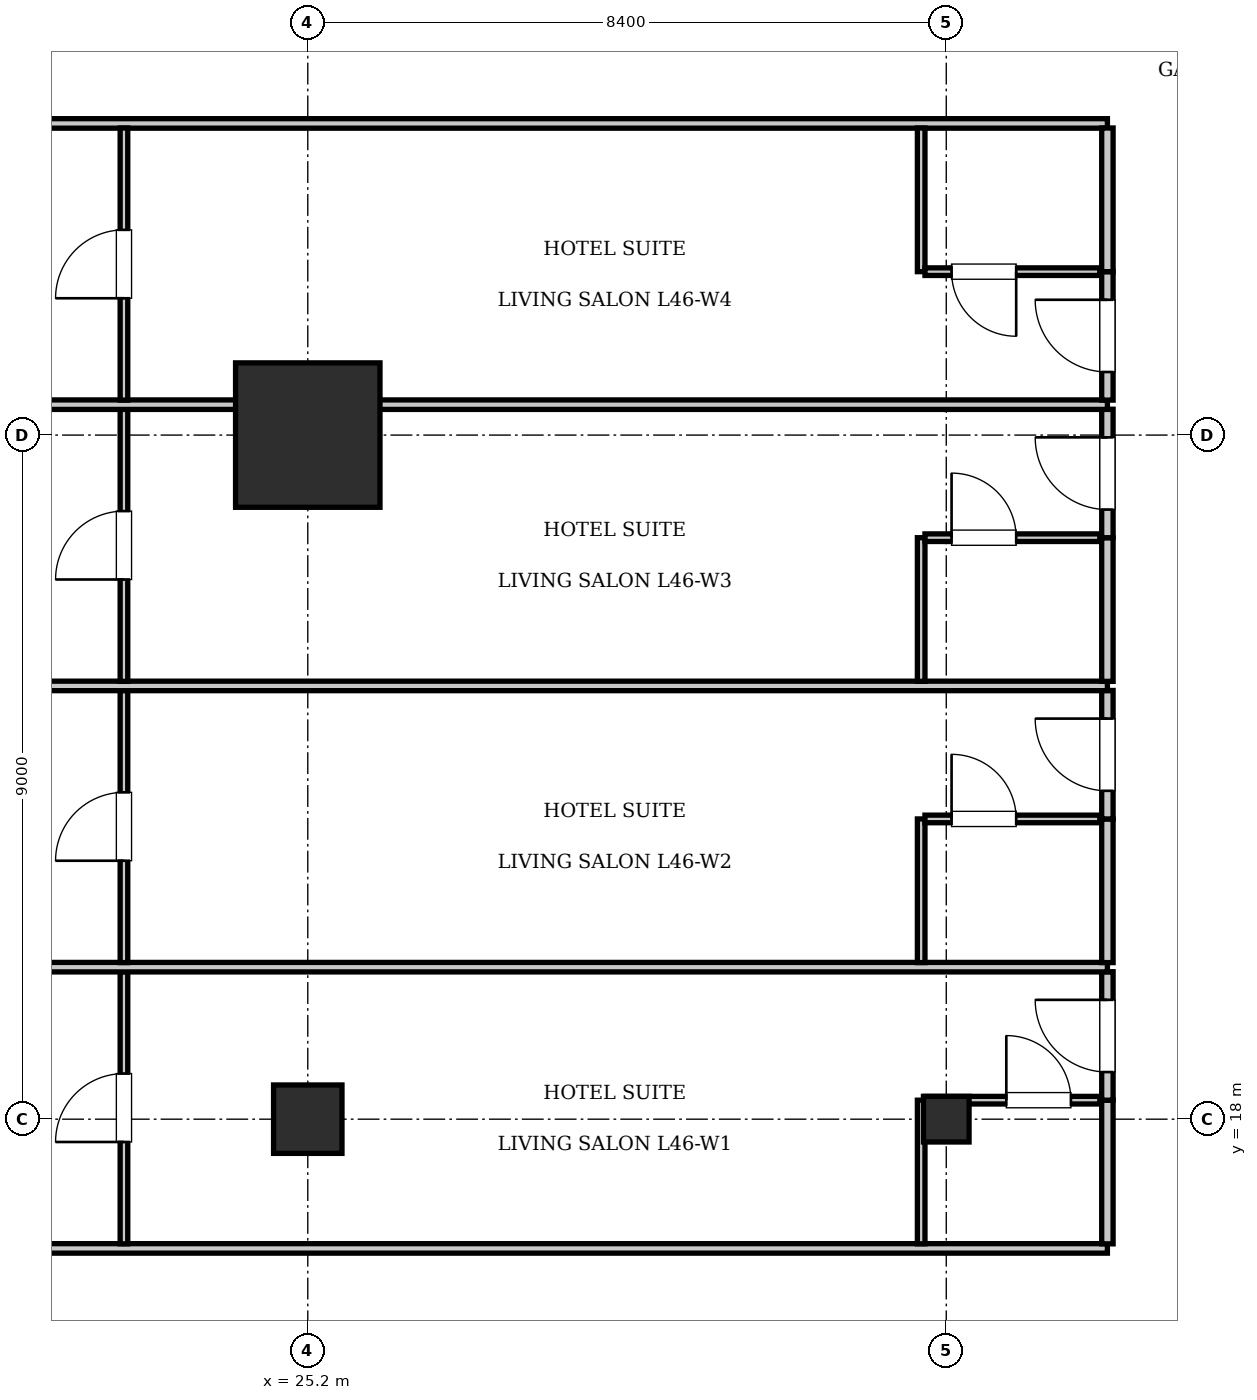
"""IFC4 building model, lengths in metres.
Left out: names, types, materials, properties, quantities, classifications, styles, units other than length and angle.
Written with IfcOpenShell. Run it as: python <this file> out.ifc"""

import sys

from ifc_helpers import new_model, si_unit, direction, frame, frame_2d, origin, origin_2d, place, context, subcontext, project, spatial, rectangle, i_section, extrude, element, fill, save


model = new_model("IFC4")
c1 = context("Model", 3, precision=1e-05, world=origin(), true_north=direction((0.0, 1.0)))
c2 = subcontext(c1, "Body", "Model", "MODEL_VIEW")
j1 = project(units=[si_unit("LENGTHUNIT", "METRE"), si_unit("PLANEANGLEUNIT", "RADIAN")], contexts=[c1])
p1 = place(None, origin())
s1 = spatial("IfcSite", under=j1, at=p1, CompositionType="ELEMENT")
p2 = place(p1, origin())
s2 = spatial("IfcBuilding", under=s1, at=p2, CompositionType="ELEMENT")
p3 = place(p2, frame((0.0, 0.0, 189.0)))
s3 = spatial("IfcBuildingStorey", under=s2, at=p3, CompositionType="ELEMENT", Elevation=189.0)
p4 = place(p3, frame((25.2, 27.0, 0.0), z_axis=(0.0, 0.0, 1.0), x_axis=(1.0, 0.0, 0.0)))
e1 = element("IfcColumn", 1, at=p4, inside=s3, PredefinedType="COLUMN", context=c2, shape_type="SweptSolid", body=[
    extrude(rectangle(XDim=1.9, YDim=1.9, at=origin_2d()), origin(), (0.0, 0.0, 1.0), 3.85),
])
p5 = place(p3, frame((25.2, 18.0, 0.0), z_axis=(0.0, 0.0, 1.0), x_axis=(1.0, 0.0, 0.0)))
e2 = element("IfcColumn", 2, at=p5, inside=s3, PredefinedType="COLUMN", context=c2, shape_type="SweptSolid", body=[
    extrude(rectangle(XDim=0.9, YDim=0.9, at=origin_2d()), origin(), (0.0, 0.0, 1.0), 3.85),
])
p6 = place(p3, frame((33.6, 18.0, 0.0), z_axis=(0.0, 0.0, 1.0), x_axis=(1.0, 0.0, 0.0)))
e3 = element("IfcColumn", 3, at=p6, inside=s3, PredefinedType="COLUMN", context=c2, shape_type="SweptSolid", body=[
    extrude(i_section(OverallWidth=0.6, OverallDepth=0.6, WebThickness=0.025, FlangeThickness=0.038, at=origin_2d()), origin(), (0.0, 0.0, 1.0), 3.85),
])
for number, where, z_axis, x_axis in (
    (4, (13.2, 16.3, 0.0), (0.0, 0.0, 1.0), (1.0, 0.0, 0.0)),
    (5, (13.2, 31.1, 0.0), (0.0, 0.0, 1.0), (1.0, 0.0, 0.0)),
):
    element("IfcWall", number, at=place(p3, frame(where, z_axis=z_axis, x_axis=x_axis)), inside=s3, PredefinedType="PARTITIONING", context=c2, shape_type="SweptSolid", body=[
        extrude(rectangle(XDim=22.52, YDim=0.125, at=frame_2d((11.26, 0.0))), origin(), (0.0, 0.0, 1.0), 3.61),
    ])
p7 = place(p3, frame((35.72, 16.36, 0.0), z_axis=(0.0, 0.0, 1.0), x_axis=(0.0, 1.0, 0.0)))
e6 = element("IfcWall", 6, at=p7, inside=s3, PredefinedType="PARTITIONING", context=c2, shape_type="SweptSolid", body=[
    extrude(rectangle(XDim=1.89, YDim=0.15, at=frame_2d((0.945, 0.0))), origin(), (0.0, 0.0, 1.0), 3.61),
])
p8 = place(p3, frame((35.72, 18.25, 0.0), z_axis=(0.0, 0.0, 1.0), x_axis=(0.0, 1.0, 0.0)))
e7 = element("IfcWall", 7, at=p8, inside=s3, PredefinedType="PARTITIONING", context=c2, shape_type="SweptSolid", body=[
    extrude(rectangle(XDim=1.69, YDim=0.15, at=frame_2d((0.845, 0.0))), origin(), (0.0, 0.0, 1.0), 3.61),
])
p9 = place(p8, frame((0.37, 0.0, 0.0)))
e8 = element("IfcOpeningElement", 8, at=p9, cuts=e7, PredefinedType="OPENING", context=c2, shape_type="SweptSolid", body=[
    extrude(rectangle(XDim=0.95, YDim=2.15, at=frame_2d((0.475, 1.075))), frame((0.0, 0.085, 0.0), z_axis=(0.0, -1.0, 0.0), x_axis=(1.0, 0.0, 0.0)), (0.0, 0.0, 1.0), 0.17),
])
p10 = place(p3, frame((33.27, 16.36, 0.0), z_axis=(0.0, 0.0, 1.0), x_axis=(0.0, 1.0, 0.0)))
e9 = element("IfcWall", 9, at=p10, inside=s3, PredefinedType="PARTITIONING", context=c2, shape_type="SweptSolid", body=[
    extrude(rectangle(XDim=1.89, YDim=0.1, at=frame_2d((0.945, 0.0))), origin(), (0.0, 0.0, 1.0), 3.61),
])
p11 = place(p3, frame((33.32, 18.25, 0.0), z_axis=(0.0, 0.0, 1.0), x_axis=(1.0, 0.0, 0.0)))
e10 = element("IfcWall", 10, at=p11, inside=s3, PredefinedType="PARTITIONING", context=c2, shape_type="SweptSolid", body=[
    extrude(rectangle(XDim=2.3, YDim=0.1, at=frame_2d((1.15, 0.0))), origin(), (0.0, 0.0, 1.0), 3.61),
])
p12 = place(p11, frame((1.07, 0.0, 0.0)))
e11 = element("IfcOpeningElement", 11, at=p12, cuts=e10, PredefinedType="OPENING", context=c2, shape_type="SweptSolid", body=[
    extrude(rectangle(XDim=0.85, YDim=2.1, at=frame_2d((0.425, 1.05))), frame((0.0, 0.06, 0.0), z_axis=(0.0, -1.0, 0.0), x_axis=(1.0, 0.0, 0.0)), (0.0, 0.0, 1.0), 0.12),
])
p13 = place(p3, frame((22.781, 16.36, 0.0), z_axis=(0.0, 0.0, 1.0), x_axis=(0.0, 1.0, 0.0)))
e12 = element("IfcWall", 12, at=p13, inside=s3, PredefinedType="PARTITIONING", context=c2, shape_type="SweptSolid", body=[
    extrude(rectangle(XDim=3.58, YDim=0.1, at=frame_2d((1.79, 0.0))), origin(), (0.0, 0.0, 1.0), 3.61),
])
p14 = place(p13, frame((1.34, 0.0, 0.0)))
e13 = element("IfcOpeningElement", 13, at=p14, cuts=e12, PredefinedType="OPENING", context=c2, shape_type="SweptSolid", body=[
    extrude(rectangle(XDim=0.9, YDim=2.1, at=frame_2d((0.45, 1.05))), frame((0.0, 0.06, 0.0), z_axis=(0.0, -1.0, 0.0), x_axis=(1.0, 0.0, 0.0)), (0.0, 0.0, 1.0), 0.12),
])
p15 = place(p3, frame((13.2, 20.0, 0.0), z_axis=(0.0, 0.0, 1.0), x_axis=(1.0, 0.0, 0.0)))
e14 = element("IfcWall", 14, at=p15, inside=s3, PredefinedType="PARTITIONING", context=c2, shape_type="SweptSolid", body=[
    extrude(rectangle(XDim=22.52, YDim=0.125, at=frame_2d((11.26, 0.0))), origin(), (0.0, 0.0, 1.0), 3.61),
])
p16 = place(p3, frame((35.72, 20.06, 0.0), z_axis=(0.0, 0.0, 1.0), x_axis=(0.0, 1.0, 0.0)))
e15 = element("IfcWall", 15, at=p16, inside=s3, PredefinedType="PARTITIONING", context=c2, shape_type="SweptSolid", body=[
    extrude(rectangle(XDim=1.89, YDim=0.15, at=frame_2d((0.945, 0.0))), origin(), (0.0, 0.0, 1.0), 3.61),
])
p17 = place(p3, frame((35.72, 21.95, 0.0), z_axis=(0.0, 0.0, 1.0), x_axis=(0.0, 1.0, 0.0)))
e16 = element("IfcWall", 16, at=p17, inside=s3, PredefinedType="PARTITIONING", context=c2, shape_type="SweptSolid", body=[
    extrude(rectangle(XDim=1.69, YDim=0.15, at=frame_2d((0.845, 0.0))), origin(), (0.0, 0.0, 1.0), 3.61),
])
p18 = place(p17, frame((0.37, 0.0, 0.0)))
e17 = element("IfcOpeningElement", 17, at=p18, cuts=e16, PredefinedType="OPENING", context=c2, shape_type="SweptSolid", body=[
    extrude(rectangle(XDim=0.95, YDim=2.15, at=frame_2d((0.475, 1.075))), frame((0.0, 0.085, 0.0), z_axis=(0.0, -1.0, 0.0), x_axis=(1.0, 0.0, 0.0)), (0.0, 0.0, 1.0), 0.17),
])
p19 = place(p3, frame((33.27, 20.06, 0.0), z_axis=(0.0, 0.0, 1.0), x_axis=(0.0, 1.0, 0.0)))
e18 = element("IfcWall", 18, at=p19, inside=s3, PredefinedType="PARTITIONING", context=c2, shape_type="SweptSolid", body=[
    extrude(rectangle(XDim=1.89, YDim=0.1, at=frame_2d((0.945, 0.0))), origin(), (0.0, 0.0, 1.0), 3.61),
])
p20 = place(p3, frame((33.32, 21.95, 0.0), z_axis=(0.0, 0.0, 1.0), x_axis=(1.0, 0.0, 0.0)))
e19 = element("IfcWall", 19, at=p20, inside=s3, PredefinedType="PARTITIONING", context=c2, shape_type="SweptSolid", body=[
    extrude(rectangle(XDim=2.3, YDim=0.1, at=frame_2d((1.15, 0.0))), origin(), (0.0, 0.0, 1.0), 3.61),
])
p21 = place(p20, frame((0.35, 0.0, 0.0)))
e20 = element("IfcOpeningElement", 20, at=p21, cuts=e19, PredefinedType="OPENING", context=c2, shape_type="SweptSolid", body=[
    extrude(rectangle(XDim=0.85, YDim=2.1, at=frame_2d((0.425, 1.05))), frame((0.0, 0.06, 0.0), z_axis=(0.0, -1.0, 0.0), x_axis=(1.0, 0.0, 0.0)), (0.0, 0.0, 1.0), 0.12),
])
p22 = place(p3, frame((22.781, 20.06, 0.0), z_axis=(0.0, 0.0, 1.0), x_axis=(0.0, 1.0, 0.0)))
e21 = element("IfcWall", 21, at=p22, inside=s3, PredefinedType="PARTITIONING", context=c2, shape_type="SweptSolid", body=[
    extrude(rectangle(XDim=3.58, YDim=0.1, at=frame_2d((1.79, 0.0))), origin(), (0.0, 0.0, 1.0), 3.61),
])
p23 = place(p22, frame((1.34, 0.0, 0.0)))
e22 = element("IfcOpeningElement", 22, at=p23, cuts=e21, PredefinedType="OPENING", context=c2, shape_type="SweptSolid", body=[
    extrude(rectangle(XDim=0.9, YDim=2.1, at=frame_2d((0.45, 1.05))), frame((0.0, 0.06, 0.0), z_axis=(0.0, -1.0, 0.0), x_axis=(1.0, 0.0, 0.0)), (0.0, 0.0, 1.0), 0.12),
])
p24 = place(p3, frame((13.2, 23.7, 0.0), z_axis=(0.0, 0.0, 1.0), x_axis=(1.0, 0.0, 0.0)))
e23 = element("IfcWall", 23, at=p24, inside=s3, PredefinedType="PARTITIONING", context=c2, shape_type="SweptSolid", body=[
    extrude(rectangle(XDim=22.52, YDim=0.125, at=frame_2d((11.26, 0.0))), origin(), (0.0, 0.0, 1.0), 3.61),
])
p25 = place(p3, frame((35.72, 23.76, 0.0), z_axis=(0.0, 0.0, 1.0), x_axis=(0.0, 1.0, 0.0)))
e24 = element("IfcWall", 24, at=p25, inside=s3, PredefinedType="PARTITIONING", context=c2, shape_type="SweptSolid", body=[
    extrude(rectangle(XDim=1.89, YDim=0.15, at=frame_2d((0.945, 0.0))), origin(), (0.0, 0.0, 1.0), 3.61),
])
p26 = place(p3, frame((35.72, 25.65, 0.0), z_axis=(0.0, 0.0, 1.0), x_axis=(0.0, 1.0, 0.0)))
e25 = element("IfcWall", 25, at=p26, inside=s3, PredefinedType="PARTITIONING", context=c2, shape_type="SweptSolid", body=[
    extrude(rectangle(XDim=1.69, YDim=0.15, at=frame_2d((0.845, 0.0))), origin(), (0.0, 0.0, 1.0), 3.61),
])
p27 = place(p26, frame((0.37, 0.0, 0.0)))
e26 = element("IfcOpeningElement", 26, at=p27, cuts=e25, PredefinedType="OPENING", context=c2, shape_type="SweptSolid", body=[
    extrude(rectangle(XDim=0.95, YDim=2.15, at=frame_2d((0.475, 1.075))), frame((0.0, 0.085, 0.0), z_axis=(0.0, -1.0, 0.0), x_axis=(1.0, 0.0, 0.0)), (0.0, 0.0, 1.0), 0.17),
])
p28 = place(p3, frame((33.27, 23.76, 0.0), z_axis=(0.0, 0.0, 1.0), x_axis=(0.0, 1.0, 0.0)))
e27 = element("IfcWall", 27, at=p28, inside=s3, PredefinedType="PARTITIONING", context=c2, shape_type="SweptSolid", body=[
    extrude(rectangle(XDim=1.89, YDim=0.1, at=frame_2d((0.945, 0.0))), origin(), (0.0, 0.0, 1.0), 3.61),
])
p29 = place(p3, frame((33.32, 25.65, 0.0), z_axis=(0.0, 0.0, 1.0), x_axis=(1.0, 0.0, 0.0)))
e28 = element("IfcWall", 28, at=p29, inside=s3, PredefinedType="PARTITIONING", context=c2, shape_type="SweptSolid", body=[
    extrude(rectangle(XDim=2.3, YDim=0.1, at=frame_2d((1.15, 0.0))), origin(), (0.0, 0.0, 1.0), 3.61),
])
p30 = place(p29, frame((0.35, 0.0, 0.0)))
e29 = element("IfcOpeningElement", 29, at=p30, cuts=e28, PredefinedType="OPENING", context=c2, shape_type="SweptSolid", body=[
    extrude(rectangle(XDim=0.85, YDim=2.1, at=frame_2d((0.425, 1.05))), frame((0.0, 0.06, 0.0), z_axis=(0.0, -1.0, 0.0), x_axis=(1.0, 0.0, 0.0)), (0.0, 0.0, 1.0), 0.12),
])
p31 = place(p3, frame((22.781, 23.76, 0.0), z_axis=(0.0, 0.0, 1.0), x_axis=(0.0, 1.0, 0.0)))
e30 = element("IfcWall", 30, at=p31, inside=s3, PredefinedType="PARTITIONING", context=c2, shape_type="SweptSolid", body=[
    extrude(rectangle(XDim=3.58, YDim=0.1, at=frame_2d((1.79, 0.0))), origin(), (0.0, 0.0, 1.0), 3.61),
])
p32 = place(p31, frame((1.34, 0.0, 0.0)))
e31 = element("IfcOpeningElement", 31, at=p32, cuts=e30, PredefinedType="OPENING", context=c2, shape_type="SweptSolid", body=[
    extrude(rectangle(XDim=0.9, YDim=2.1, at=frame_2d((0.45, 1.05))), frame((0.0, 0.06, 0.0), z_axis=(0.0, -1.0, 0.0), x_axis=(1.0, 0.0, 0.0)), (0.0, 0.0, 1.0), 0.12),
])
p33 = place(p3, frame((13.2, 27.4, 0.0), z_axis=(0.0, 0.0, 1.0), x_axis=(1.0, 0.0, 0.0)))
e32 = element("IfcWall", 32, at=p33, inside=s3, PredefinedType="PARTITIONING", context=c2, shape_type="SweptSolid", body=[
    extrude(rectangle(XDim=22.52, YDim=0.125, at=frame_2d((11.26, 0.0))), origin(), (0.0, 0.0, 1.0), 3.61),
])
p34 = place(p3, frame((35.72, 27.46, 0.0), z_axis=(0.0, 0.0, 1.0), x_axis=(0.0, 1.0, 0.0)))
e33 = element("IfcWall", 33, at=p34, inside=s3, PredefinedType="PARTITIONING", context=c2, shape_type="SweptSolid", body=[
    extrude(rectangle(XDim=1.69, YDim=0.15, at=frame_2d((0.845, 0.0))), origin(), (0.0, 0.0, 1.0), 3.61),
])
p35 = place(p34, frame((0.37, 0.0, 0.0)))
e34 = element("IfcOpeningElement", 34, at=p35, cuts=e33, PredefinedType="OPENING", context=c2, shape_type="SweptSolid", body=[
    extrude(rectangle(XDim=0.95, YDim=2.15, at=frame_2d((0.475, 1.075))), frame((0.0, 0.085, 0.0), z_axis=(0.0, -1.0, 0.0), x_axis=(1.0, 0.0, 0.0)), (0.0, 0.0, 1.0), 0.17),
])
p36 = place(p3, frame((35.72, 29.15, 0.0), z_axis=(0.0, 0.0, 1.0), x_axis=(0.0, 1.0, 0.0)))
e35 = element("IfcWall", 35, at=p36, inside=s3, PredefinedType="PARTITIONING", context=c2, shape_type="SweptSolid", body=[
    extrude(rectangle(XDim=1.89, YDim=0.15, at=frame_2d((0.945, 0.0))), origin(), (0.0, 0.0, 1.0), 3.61),
])
p37 = place(p3, frame((33.27, 29.15, 0.0), z_axis=(0.0, 0.0, 1.0), x_axis=(0.0, 1.0, 0.0)))
e36 = element("IfcWall", 36, at=p37, inside=s3, PredefinedType="PARTITIONING", context=c2, shape_type="SweptSolid", body=[
    extrude(rectangle(XDim=1.89, YDim=0.1, at=frame_2d((0.945, 0.0))), origin(), (0.0, 0.0, 1.0), 3.61),
])
p38 = place(p3, frame((33.32, 29.15, 0.0), z_axis=(0.0, 0.0, 1.0), x_axis=(1.0, 0.0, 0.0)))
e37 = element("IfcWall", 37, at=p38, inside=s3, PredefinedType="PARTITIONING", context=c2, shape_type="SweptSolid", body=[
    extrude(rectangle(XDim=2.3, YDim=0.1, at=frame_2d((1.15, 0.0))), origin(), (0.0, 0.0, 1.0), 3.61),
])
p39 = place(p38, frame((0.35, 0.0, 0.0)))
e38 = element("IfcOpeningElement", 38, at=p39, cuts=e37, PredefinedType="OPENING", context=c2, shape_type="SweptSolid", body=[
    extrude(rectangle(XDim=0.85, YDim=2.1, at=frame_2d((0.425, 1.05))), frame((0.0, 0.06, 0.0), z_axis=(0.0, -1.0, 0.0), x_axis=(1.0, 0.0, 0.0)), (0.0, 0.0, 1.0), 0.12),
])
p40 = place(p3, frame((22.781, 27.46, 0.0), z_axis=(0.0, 0.0, 1.0), x_axis=(0.0, 1.0, 0.0)))
e39 = element("IfcWall", 39, at=p40, inside=s3, PredefinedType="PARTITIONING", context=c2, shape_type="SweptSolid", body=[
    extrude(rectangle(XDim=3.58, YDim=0.1, at=frame_2d((1.79, 0.0))), origin(), (0.0, 0.0, 1.0), 3.61),
])
p41 = place(p40, frame((1.34, 0.0, 0.0)))
e40 = element("IfcOpeningElement", 40, at=p41, cuts=e39, PredefinedType="OPENING", context=c2, shape_type="SweptSolid", body=[
    extrude(rectangle(XDim=0.9, YDim=2.1, at=frame_2d((0.45, 1.05))), frame((0.0, 0.06, 0.0), z_axis=(0.0, -1.0, 0.0), x_axis=(1.0, 0.0, 0.0)), (0.0, 0.0, 1.0), 0.12),
])
p42 = place(p12, origin())
e41 = element("IfcDoor", 41, at=p42, inside=s3, OperationType="SINGLE_SWING_LEFT", PredefinedType="DOOR", context=c2, shape_type="SweptSolid", body=[
    extrude(rectangle(XDim=0.85, YDim=2.1, at=frame_2d((0.425, 1.05))), frame((0.0, 0.025, 0.0), z_axis=(0.0, -1.0, 0.0), x_axis=(1.0, 0.0, 0.0)), (0.0, 0.0, 1.0), 0.05),
])
fill(e11, e41)
p43 = place(p9, origin())
e42 = element("IfcDoor", 42, at=p43, inside=s3, OperationType="SINGLE_SWING_RIGHT", PredefinedType="DOOR", context=c2, shape_type="SweptSolid", body=[
    extrude(rectangle(XDim=0.95, YDim=2.15, at=frame_2d((0.475, 1.075))), frame((0.0, 0.025, 0.0), z_axis=(0.0, -1.0, 0.0), x_axis=(1.0, 0.0, 0.0)), (0.0, 0.0, 1.0), 0.05),
])
fill(e8, e42)
p44 = place(p14, origin())
e43 = element("IfcDoor", 43, at=p44, inside=s3, OperationType="SINGLE_SWING_LEFT", PredefinedType="DOOR", context=c2, shape_type="SweptSolid", body=[
    extrude(rectangle(XDim=0.9, YDim=2.1, at=frame_2d((0.45, 1.05))), frame((0.0, 0.025, 0.0), z_axis=(0.0, -1.0, 0.0), x_axis=(1.0, 0.0, 0.0)), (0.0, 0.0, 1.0), 0.05),
])
fill(e13, e43)
p45 = place(p21, origin())
e44 = element("IfcDoor", 44, at=p45, inside=s3, OperationType="SINGLE_SWING_LEFT", PredefinedType="DOOR", context=c2, shape_type="SweptSolid", body=[
    extrude(rectangle(XDim=0.85, YDim=2.1, at=frame_2d((0.425, 1.05))), frame((0.0, 0.025, 0.0), z_axis=(0.0, -1.0, 0.0), x_axis=(1.0, 0.0, 0.0)), (0.0, 0.0, 1.0), 0.05),
])
fill(e20, e44)
p46 = place(p18, origin())
e45 = element("IfcDoor", 45, at=p46, inside=s3, OperationType="SINGLE_SWING_RIGHT", PredefinedType="DOOR", context=c2, shape_type="SweptSolid", body=[
    extrude(rectangle(XDim=0.95, YDim=2.15, at=frame_2d((0.475, 1.075))), frame((0.0, 0.025, 0.0), z_axis=(0.0, -1.0, 0.0), x_axis=(1.0, 0.0, 0.0)), (0.0, 0.0, 1.0), 0.05),
])
fill(e17, e45)
p47 = place(p23, origin())
e46 = element("IfcDoor", 46, at=p47, inside=s3, OperationType="SINGLE_SWING_LEFT", PredefinedType="DOOR", context=c2, shape_type="SweptSolid", body=[
    extrude(rectangle(XDim=0.9, YDim=2.1, at=frame_2d((0.45, 1.05))), frame((0.0, 0.025, 0.0), z_axis=(0.0, -1.0, 0.0), x_axis=(1.0, 0.0, 0.0)), (0.0, 0.0, 1.0), 0.05),
])
fill(e22, e46)
p48 = place(p30, origin())
e47 = element("IfcDoor", 47, at=p48, inside=s3, OperationType="SINGLE_SWING_LEFT", PredefinedType="DOOR", context=c2, shape_type="SweptSolid", body=[
    extrude(rectangle(XDim=0.85, YDim=2.1, at=frame_2d((0.425, 1.05))), frame((0.0, 0.025, 0.0), z_axis=(0.0, -1.0, 0.0), x_axis=(1.0, 0.0, 0.0)), (0.0, 0.0, 1.0), 0.05),
])
fill(e29, e47)
p49 = place(p27, origin())
e48 = element("IfcDoor", 48, at=p49, inside=s3, OperationType="SINGLE_SWING_RIGHT", PredefinedType="DOOR", context=c2, shape_type="SweptSolid", body=[
    extrude(rectangle(XDim=0.95, YDim=2.15, at=frame_2d((0.475, 1.075))), frame((0.0, 0.025, 0.0), z_axis=(0.0, -1.0, 0.0), x_axis=(1.0, 0.0, 0.0)), (0.0, 0.0, 1.0), 0.05),
])
fill(e26, e48)
p50 = place(p32, origin())
e49 = element("IfcDoor", 49, at=p50, inside=s3, OperationType="SINGLE_SWING_LEFT", PredefinedType="DOOR", context=c2, shape_type="SweptSolid", body=[
    extrude(rectangle(XDim=0.9, YDim=2.1, at=frame_2d((0.45, 1.05))), frame((0.0, 0.025, 0.0), z_axis=(0.0, -1.0, 0.0), x_axis=(1.0, 0.0, 0.0)), (0.0, 0.0, 1.0), 0.05),
])
fill(e31, e49)
p51 = place(p39, frame((0.85, 0.0, 0.0), z_axis=(0.0, 0.0, 1.0), x_axis=(-1.0, 0.0, 0.0)))
e50 = element("IfcDoor", 50, at=p51, inside=s3, OperationType="SINGLE_SWING_LEFT", PredefinedType="DOOR", context=c2, shape_type="SweptSolid", body=[
    extrude(rectangle(XDim=0.85, YDim=2.1, at=frame_2d((0.425, 1.05))), frame((0.0, 0.025, 0.0), z_axis=(0.0, -1.0, 0.0), x_axis=(1.0, 0.0, 0.0)), (0.0, 0.0, 1.0), 0.05),
])
fill(e38, e50)
p52 = place(p35, origin())
e51 = element("IfcDoor", 51, at=p52, inside=s3, OperationType="SINGLE_SWING_RIGHT", PredefinedType="DOOR", context=c2, shape_type="SweptSolid", body=[
    extrude(rectangle(XDim=0.95, YDim=2.15, at=frame_2d((0.475, 1.075))), frame((0.0, 0.025, 0.0), z_axis=(0.0, -1.0, 0.0), x_axis=(1.0, 0.0, 0.0)), (0.0, 0.0, 1.0), 0.05),
])
fill(e34, e51)
p53 = place(p41, origin())
e52 = element("IfcDoor", 52, at=p53, inside=s3, OperationType="SINGLE_SWING_LEFT", PredefinedType="DOOR", context=c2, shape_type="SweptSolid", body=[
    extrude(rectangle(XDim=0.9, YDim=2.1, at=frame_2d((0.45, 1.05))), frame((0.0, 0.025, 0.0), z_axis=(0.0, -1.0, 0.0), x_axis=(1.0, 0.0, 0.0)), (0.0, 0.0, 1.0), 0.05),
])
fill(e40, e52)
save(model, sys.argv[1])
